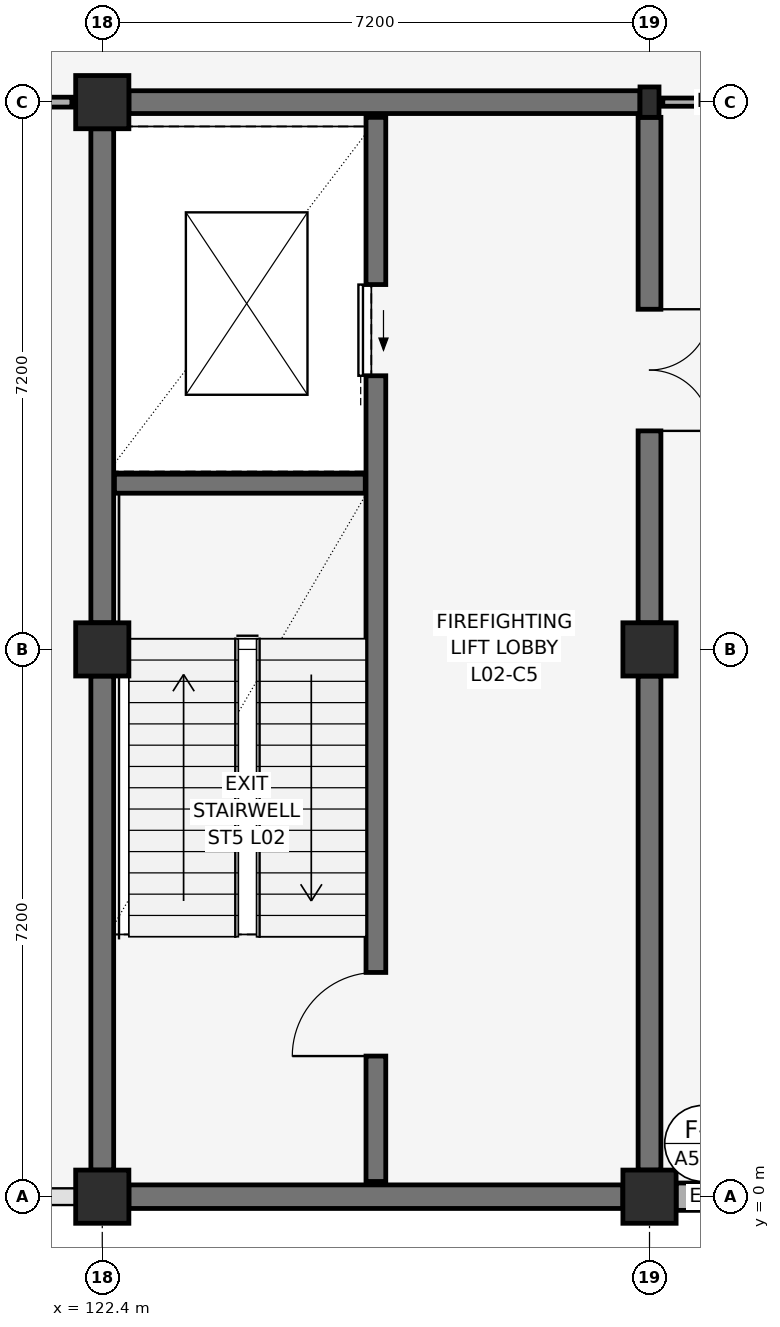
"""IFC4 building model, lengths in metres.
Left out: names, types, materials, properties, quantities, classifications, styles, units other than length and angle.
Written with IfcOpenShell. Run it as: python <this file> out.ifc"""

import sys

from ifc_helpers import new_model, si_unit, direction, frame, frame_2d, origin, origin_2d, place, context, subcontext, project, spatial, rectangle, hollow_rectangle, extrude, element, fill, save


model = new_model("IFC4")
c1 = context("Model", 3, precision=1e-05, world=origin(), true_north=direction((0.0, 1.0)))
c2 = subcontext(c1, "Body", "Model", "MODEL_VIEW")
j1 = project(units=[si_unit("LENGTHUNIT", "METRE"), si_unit("PLANEANGLEUNIT", "RADIAN")], contexts=[c1])
p1 = place(None, origin())
s1 = spatial("IfcSite", under=j1, at=p1, CompositionType="ELEMENT")
p2 = place(p1, origin())
s2 = spatial("IfcBuilding", under=s1, at=p2, CompositionType="ELEMENT")
p3 = place(p2, frame((0.0, 0.0, 10.2)))
s3 = spatial("IfcBuildingStorey", under=s2, at=p3, CompositionType="ELEMENT", Elevation=10.2)
for number, where, z_axis, x_axis in (
    (1, (122.4, 0.0, 0.0), (0.0, 0.0, 1.0), (1.0, 0.0, 0.0)),
    (2, (122.4, 7.2, 0.0), (0.0, 0.0, 1.0), (1.0, 0.0, 0.0)),
    (3, (122.4, 14.4, 0.0), (0.0, 0.0, 1.0), (1.0, 0.0, 0.0)),
    (4, (129.6, 0.0, 0.0), (0.0, 0.0, 1.0), (1.0, 0.0, 0.0)),
    (5, (129.6, 7.2, 0.0), (0.0, 0.0, 1.0), (1.0, 0.0, 0.0)),
):
    element("IfcColumn", number, at=place(p3, frame(where, z_axis=z_axis, x_axis=x_axis)), inside=s3, PredefinedType="COLUMN", context=c2, shape_type="SweptSolid", body=[
        extrude(rectangle(XDim=0.7, YDim=0.7, at=origin_2d()), origin(), (0.0, 0.0, 1.0), 4.8),
    ])
p4 = place(p3, frame((129.6, 14.4, 0.0), z_axis=(0.0, 0.0, 1.0), x_axis=(1.0, 0.0, 0.0)))
e6 = element("IfcColumn", 6, at=p4, inside=s3, PredefinedType="COLUMN", context=c2, shape_type="SweptSolid", body=[
    extrude(hollow_rectangle(XDim=0.25, YDim=0.4, WallThickness=0.014, at=origin_2d()), origin(), (0.0, 0.0, 1.0), 4.8),
])
p5 = place(p3, frame((129.95, 0.0, 0.0), z_axis=(0.0, 0.0, 1.0), x_axis=(1.0, 0.0, 0.0)))
e7 = element("IfcWall", 7, at=p5, inside=s3, PredefinedType="SOLIDWALL", context=c2, shape_type="SweptSolid", body=[
    extrude(rectangle(XDim=6.5, YDim=0.36, at=frame_2d((3.25, 0.0))), origin(), (0.0, 0.0, 1.0), 3.76),
])
p6 = place(p5, frame((2.2, 0.0, 0.95)))
e8 = element("IfcOpeningElement", 8, at=p6, cuts=e7, PredefinedType="OPENING", context=c2, shape_type="SweptSolid", body=[
    extrude(rectangle(XDim=2.1, YDim=1.75, at=frame_2d((1.05, 0.875))), frame((0.0, 0.195, 0.0), z_axis=(0.0, -1.0, 0.0), x_axis=(1.0, 0.0, 0.0)), (0.0, 0.0, 1.0), 0.39),
])
p7 = place(p3, frame((122.75, 0.0, 0.0), z_axis=(0.0, 0.0, 1.0), x_axis=(1.0, 0.0, 0.0)))
e9 = element("IfcWall", 9, at=p7, inside=s3, PredefinedType="SHEAR", context=c2, shape_type="SweptSolid", body=[
    extrude(rectangle(XDim=6.5, YDim=0.31, at=frame_2d((3.25, 0.0))), origin(), (0.0, 0.0, 1.0), 4.56),
])
p8 = place(p3, frame((122.75, 14.4, 0.0), z_axis=(0.0, 0.0, 1.0), x_axis=(1.0, 0.0, 0.0)))
e10 = element("IfcWall", 10, at=p8, inside=s3, PredefinedType="SHEAR", context=c2, shape_type="SweptSolid", body=[
    extrude(rectangle(XDim=6.725, YDim=0.3, at=frame_2d((3.363, 0.0))), origin(), (0.0, 0.0, 1.0), 4.56),
])
for number, where, z_axis, x_axis in (
    (11, (122.4, 0.35, 0.0), (0.0, 0.0, 1.0), (0.0, 1.0, 0.0)),
    (12, (122.4, 7.55, 0.0), (0.0, 0.0, 1.0), (0.0, 1.0, 0.0)),
    (13, (129.6, 0.35, 0.0), (0.0, 0.0, 1.0), (0.0, 1.0, 0.0)),
):
    element("IfcWall", number, at=place(p3, frame(where, z_axis=z_axis, x_axis=x_axis)), inside=s3, PredefinedType="SHEAR", context=c2, shape_type="SweptSolid", body=[
        extrude(rectangle(XDim=6.5, YDim=0.3, at=frame_2d((3.25, 0.0))), origin(), (0.0, 0.0, 1.0), 4.56),
    ])
p9 = place(p3, frame((129.6, 7.55, 0.0), z_axis=(0.0, 0.0, 1.0), x_axis=(0.0, 1.0, 0.0)))
e14 = element("IfcWall", 14, at=p9, inside=s3, PredefinedType="SHEAR", context=c2, shape_type="SweptSolid", body=[
    extrude(rectangle(XDim=6.65, YDim=0.3, at=frame_2d((3.325, 0.0))), origin(), (0.0, 0.0, 1.0), 4.56),
])
p10 = place(p9, frame((2.525, 0.0, 0.0)))
e15 = element("IfcOpeningElement", 15, at=p10, cuts=e14, PredefinedType="OPENING", context=c2, shape_type="SweptSolid", body=[
    extrude(rectangle(XDim=1.6, YDim=2.2, at=frame_2d((0.8, 1.1))), frame((0.0, 0.165, 0.0), z_axis=(0.0, -1.0, 0.0), x_axis=(1.0, 0.0, 0.0)), (0.0, 0.0, 1.0), 0.33),
])
p11 = place(p3, frame((126.0, 0.2, 0.0), z_axis=(0.0, 0.0, 1.0), x_axis=(0.0, 1.0, 0.0)))
e16 = element("IfcWall", 16, at=p11, inside=s3, PredefinedType="SHEAR", context=c2, shape_type="SweptSolid", body=[
    extrude(rectangle(XDim=14.0, YDim=0.26, at=frame_2d((7.0, 0.0))), origin(), (0.0, 0.0, 1.0), 4.56),
])
p12 = place(p11, frame((1.65, 0.0, 0.0)))
e17 = element("IfcOpeningElement", 17, at=p12, cuts=e16, PredefinedType="OPENING", context=c2, shape_type="SweptSolid", body=[
    extrude(rectangle(XDim=1.1, YDim=2.15, at=frame_2d((0.55, 1.075))), frame((0.0, 0.145, 0.0), z_axis=(0.0, -1.0, 0.0), x_axis=(1.0, 0.0, 0.0)), (0.0, 0.0, 1.0), 0.29),
])
p13 = place(p11, frame((10.6, 0.0, 0.0)))
e18 = element("IfcOpeningElement", 18, at=p13, cuts=e16, PredefinedType="OPENING", context=c2, shape_type="SweptSolid", body=[
    extrude(rectangle(XDim=1.2, YDim=2.25, at=frame_2d((0.6, 1.125))), frame((0.0, 0.145, 0.0), z_axis=(0.0, -1.0, 0.0), x_axis=(1.0, 0.0, 0.0)), (0.0, 0.0, 1.0), 0.29),
])
p14 = place(p3, frame((122.56, 9.38, 0.0), z_axis=(0.0, 0.0, 1.0), x_axis=(1.0, 0.0, 0.0)))
e19 = element("IfcWall", 19, at=p14, inside=s3, PredefinedType="SHEAR", context=c2, shape_type="SweptSolid", body=[
    extrude(rectangle(XDim=3.3, YDim=0.25, at=frame_2d((1.65, 0.0))), origin(), (0.0, 0.0, 1.0), 4.56),
])
p15 = place(p3, frame((115.6, 14.4, 0.0), z_axis=(0.0, 0.0, 1.0), x_axis=(1.0, 0.0, 0.0)))
e20 = element("IfcWall", 20, at=p15, inside=s3, PredefinedType="PARTITIONING", context=c2, shape_type="SweptSolid", body=[
    extrude(rectangle(XDim=6.4, YDim=0.13, at=frame_2d((3.2, 0.0))), origin(), (0.0, 0.0, 1.0), 4.072),
])
p16 = place(p15, frame((2.73, 0.0, 0.0)))
e21 = element("IfcOpeningElement", 21, at=p16, cuts=e20, PredefinedType="OPENING", context=c2, shape_type="SweptSolid", body=[
    extrude(rectangle(XDim=0.94, YDim=2.15, at=frame_2d((0.47, 1.075))), frame((0.0, 0.08, 0.0), z_axis=(0.0, -1.0, 0.0), x_axis=(1.0, 0.0, 0.0)), (0.0, 0.0, 1.0), 0.16),
])
p17 = place(p3, frame((129.775, 14.4, 0.0), z_axis=(0.0, 0.0, 1.0), x_axis=(1.0, 0.0, 0.0)))
e22 = element("IfcWall", 22, at=p17, inside=s3, PredefinedType="PARTITIONING", context=c2, shape_type="SweptSolid", body=[
    extrude(rectangle(XDim=6.625, YDim=0.108, at=frame_2d((3.312, 0.0))), origin(), (0.0, 0.0, 1.0), 4.072),
])
p18 = place(p17, frame((2.665, 0.0, 0.0)))
e23 = element("IfcOpeningElement", 23, at=p18, cuts=e22, PredefinedType="OPENING", context=c2, shape_type="SweptSolid", body=[
    extrude(rectangle(XDim=1.52, YDim=2.2, at=frame_2d((0.76, 1.1))), frame((0.0, 0.069, 0.0), z_axis=(0.0, -1.0, 0.0), x_axis=(1.0, 0.0, 0.0)), (0.0, 0.0, 1.0), 0.138),
])
p19 = place(p12, origin())
e24 = element("IfcDoor", 24, at=p19, inside=s3, OperationType="SINGLE_SWING_LEFT", PredefinedType="DOOR", context=c2, shape_type="SweptSolid", body=[
    extrude(rectangle(XDim=1.1, YDim=2.15, at=frame_2d((0.55, 1.075))), frame((0.0, 0.025, 0.0), z_axis=(0.0, -1.0, 0.0), x_axis=(1.0, 0.0, 0.0)), (0.0, 0.0, 1.0), 0.05),
])
fill(e17, e24)
p20 = place(p13, frame((1.2, 0.0, 0.0), z_axis=(0.0, 0.0, 1.0), x_axis=(-1.0, 0.0, 0.0)))
e25 = element("IfcDoor", 25, at=p20, inside=s3, OperationType="SLIDING_TO_LEFT", PredefinedType="DOOR", context=c2, shape_type="SweptSolid", body=[
    extrude(rectangle(XDim=1.2, YDim=2.25, at=frame_2d((0.6, 1.125))), frame((0.0, 0.025, 0.0), z_axis=(0.0, -1.0, 0.0), x_axis=(1.0, 0.0, 0.0)), (0.0, 0.0, 1.0), 0.05),
])
fill(e18, e25)
p21 = place(p10, frame((1.6, 0.0, 0.0), z_axis=(0.0, 0.0, 1.0), x_axis=(-1.0, 0.0, 0.0)))
e26 = element("IfcDoor", 26, at=p21, inside=s3, OperationType="DOUBLE_SWING_LEFT", PredefinedType="DOOR", context=c2, shape_type="SweptSolid", body=[
    extrude(rectangle(XDim=1.6, YDim=2.2, at=frame_2d((0.8, 1.1))), frame((0.0, 0.025, 0.0), z_axis=(0.0, -1.0, 0.0), x_axis=(1.0, 0.0, 0.0)), (0.0, 0.0, 1.0), 0.05),
])
fill(e15, e26)
save(model, sys.argv[1])
